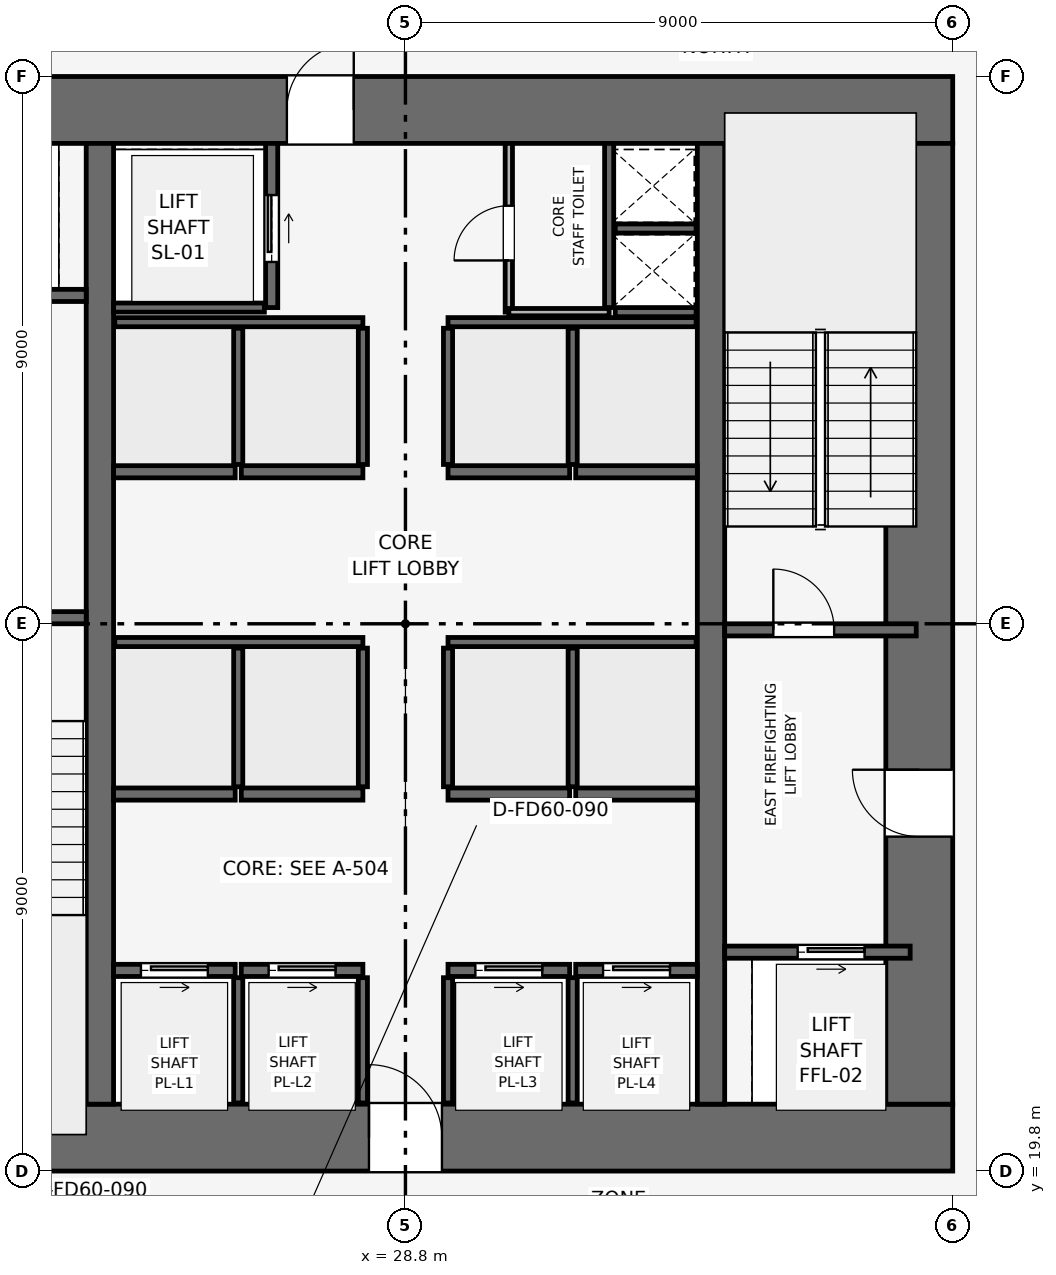
"""IFC4 building model, lengths in metres.
Left out: names, types, materials, properties, quantities, classifications, styles, units other than length and angle.
Written with IfcOpenShell. Run it as: python <this file> out.ifc"""

import sys

from ifc_helpers import new_model, si_unit, direction, frame, frame_2d, origin, place, context, subcontext, project, spatial, rectangle, extrude, element, fill, save


model = new_model("IFC4")
c1 = context("Model", 3, precision=1e-05, world=origin(), true_north=direction((0.0, 1.0)))
c2 = subcontext(c1, "Body", "Model", "MODEL_VIEW")
j1 = project(units=[si_unit("LENGTHUNIT", "METRE"), si_unit("PLANEANGLEUNIT", "RADIAN")], contexts=[c1])
p1 = place(None, origin())
s1 = spatial("IfcSite", under=j1, at=p1, CompositionType="ELEMENT")
p2 = place(p1, origin())
s2 = spatial("IfcBuilding", under=s1, at=p2, CompositionType="ELEMENT")
p3 = place(p2, frame((0.0, 0.0, 65.1)))
s3 = spatial("IfcBuildingStorey", under=s2, at=p3, CompositionType="ELEMENT", Elevation=65.1)
p4 = place(p3, frame((19.8, 20.35, 0.0), z_axis=(0.0, 0.0, 1.0), x_axis=(1.0, 0.0, 0.0)))
e1 = element("IfcWall", 1, at=p4, inside=s3, PredefinedType="SHEAR", context=c2, shape_type="SweptSolid", body=[
    extrude(rectangle(XDim=18.0, YDim=1.1, at=frame_2d((9.0, 0.0))), origin(), (0.0, 0.0, 1.0), 3.9),
])
p5 = place(p4, frame((8.4, 0.0, 0.0)))
e2 = element("IfcOpeningElement", 2, at=p5, cuts=e1, PredefinedType="OPENING", context=c2, shape_type="SweptSolid", body=[
    extrude(rectangle(XDim=1.2, YDim=2.2, at=frame_2d((0.6, 1.1))), frame((0.0, 0.56, 0.0), z_axis=(0.0, -1.0, 0.0), x_axis=(1.0, 0.0, 0.0)), (0.0, 0.0, 1.0), 1.12),
])
p6 = place(p3, frame((19.8, 37.25, 0.0), z_axis=(0.0, 0.0, 1.0), x_axis=(1.0, 0.0, 0.0)))
e3 = element("IfcWall", 3, at=p6, inside=s3, PredefinedType="SHEAR", context=c2, shape_type="SweptSolid", body=[
    extrude(rectangle(XDim=18.0, YDim=1.1, at=frame_2d((9.0, 0.0))), origin(), (0.0, 0.0, 1.0), 3.9),
])
p7 = place(p6, frame((7.05, 0.0, 0.0)))
e4 = element("IfcOpeningElement", 4, at=p7, cuts=e3, PredefinedType="OPENING", context=c2, shape_type="SweptSolid", body=[
    extrude(rectangle(XDim=1.1, YDim=2.15, at=frame_2d((0.55, 1.075))), frame((0.0, 0.56, 0.0), z_axis=(0.0, -1.0, 0.0), x_axis=(1.0, 0.0, 0.0)), (0.0, 0.0, 1.0), 1.12),
])
p8 = place(p3, frame((37.25, 20.9, 0.0), z_axis=(0.0, 0.0, 1.0), x_axis=(0.0, 1.0, 0.0)))
e5 = element("IfcWall", 5, at=p8, inside=s3, PredefinedType="SHEAR", context=c2, shape_type="SweptSolid", body=[
    extrude(rectangle(XDim=15.8, YDim=1.1, at=frame_2d((7.9, 0.0))), origin(), (0.0, 0.0, 1.0), 3.9),
])
p9 = place(p8, frame((4.4, 0.0, 0.0)))
e6 = element("IfcOpeningElement", 6, at=p9, cuts=e5, PredefinedType="OPENING", context=c2, shape_type="SweptSolid", body=[
    extrude(rectangle(XDim=1.1, YDim=2.15, at=frame_2d((0.55, 1.075))), frame((0.0, 0.56, 0.0), z_axis=(0.0, -1.0, 0.0), x_axis=(1.0, 0.0, 0.0)), (0.0, 0.0, 1.0), 1.12),
])
for number, where, z_axis, x_axis in (
    (7, (23.775, 20.9, 0.0), (0.0, 0.0, 1.0), (0.0, 1.0, 0.0)),
    (8, (33.825, 20.9, 0.0), (0.0, 0.0, 1.0), (0.0, 1.0, 0.0)),
):
    element("IfcWall", number, at=place(p3, frame(where, z_axis=z_axis, x_axis=x_axis)), inside=s3, PredefinedType="SHEAR", context=c2, shape_type="SweptSolid", body=[
        extrude(rectangle(XDim=15.8, YDim=0.45, at=frame_2d((7.9, 0.0))), origin(), (0.0, 0.0, 1.0), 3.9),
    ])
p10 = place(p3, frame((20.4, 28.9, 0.0), z_axis=(0.0, 0.0, 1.0), x_axis=(1.0, 0.0, 0.0)))
e9 = element("IfcWall", 9, at=p10, inside=s3, PredefinedType="SHEAR", context=c2, shape_type="SweptSolid", body=[
    extrude(rectangle(XDim=3.15, YDim=0.2, at=frame_2d((1.575, 0.0))), origin(), (0.0, 0.0, 1.0), 3.65),
])
p11 = place(p10, frame((0.8, 0.0, 0.0)))
e10 = element("IfcOpeningElement", 10, at=p11, cuts=e9, PredefinedType="OPENING", context=c2, shape_type="SweptSolid", body=[
    extrude(rectangle(XDim=1.0, YDim=2.1, at=frame_2d((0.5, 1.05))), frame((0.0, 0.11, 0.0), z_axis=(0.0, -1.0, 0.0), x_axis=(1.0, 0.0, 0.0)), (0.0, 0.0, 1.0), 0.22),
])
p12 = place(p3, frame((34.05, 28.7, 0.0), z_axis=(0.0, 0.0, 1.0), x_axis=(1.0, 0.0, 0.0)))
e11 = element("IfcWall", 11, at=p12, inside=s3, PredefinedType="SHEAR", context=c2, shape_type="SweptSolid", body=[
    extrude(rectangle(XDim=3.15, YDim=0.2, at=frame_2d((1.575, 0.0))), origin(), (0.0, 0.0, 1.0), 3.65),
])
p13 = place(p12, frame((0.8, 0.0, 0.0)))
e12 = element("IfcOpeningElement", 12, at=p13, cuts=e11, PredefinedType="OPENING", context=c2, shape_type="SweptSolid", body=[
    extrude(rectangle(XDim=1.0, YDim=2.1, at=frame_2d((0.5, 1.05))), frame((0.0, 0.11, 0.0), z_axis=(0.0, -1.0, 0.0), x_axis=(1.0, 0.0, 0.0)), (0.0, 0.0, 1.0), 0.22),
])
p14 = place(p3, frame((32.15, 34.0, 0.0), z_axis=(0.0, 0.0, 1.0), x_axis=(0.0, 1.0, 0.0)))
e13 = element("IfcWall", 13, at=p14, inside=s3, PredefinedType="SHEAR", context=c2, shape_type="SweptSolid", body=[
    extrude(rectangle(XDim=2.7, YDim=0.15, at=frame_2d((1.35, 0.0))), origin(), (0.0, 0.0, 1.0), 3.65),
])
for number, where, z_axis, x_axis in (
    (14, (32.25, 33.925, 0.0), (0.0, 0.0, 1.0), (1.0, 0.0, 0.0)),
    (15, (32.25, 35.3, 0.0), (0.0, 0.0, 1.0), (1.0, 0.0, 0.0)),
):
    element("IfcWall", number, at=place(p3, frame(where, z_axis=z_axis, x_axis=x_axis)), inside=s3, PredefinedType="SHEAR", context=c2, shape_type="SweptSolid", body=[
        extrude(rectangle(XDim=1.33, YDim=0.15, at=frame_2d((0.665, 0.0))), origin(), (0.0, 0.0, 1.0), 3.65),
    ])
p15 = place(p3, frame((20.5, 34.2, 0.0), z_axis=(0.0, 0.0, 1.0), x_axis=(1.0, 0.0, 0.0)))
e16 = element("IfcWall", 16, at=p15, inside=s3, PredefinedType="SHEAR", context=c2, shape_type="SweptSolid", body=[
    extrude(rectangle(XDim=3.05, YDim=0.2, at=frame_2d((1.525, 0.0))), origin(), (0.0, 0.0, 1.0), 3.65),
])
p16 = place(p15, frame((0.75, 0.0, 0.0)))
e17 = element("IfcOpeningElement", 17, at=p16, cuts=e16, PredefinedType="OPENING", context=c2, shape_type="SweptSolid", body=[
    extrude(rectangle(XDim=1.1, YDim=2.15, at=frame_2d((0.55, 1.075))), frame((0.0, 0.11, 0.0), z_axis=(0.0, -1.0, 0.0), x_axis=(1.0, 0.0, 0.0)), (0.0, 0.0, 1.0), 0.22),
])
p17 = place(p3, frame((34.05, 23.4, 0.0), z_axis=(0.0, 0.0, 1.0), x_axis=(1.0, 0.0, 0.0)))
e18 = element("IfcWall", 18, at=p17, inside=s3, PredefinedType="SHEAR", context=c2, shape_type="SweptSolid", body=[
    extrude(rectangle(XDim=3.05, YDim=0.2, at=frame_2d((1.525, 0.0))), origin(), (0.0, 0.0, 1.0), 3.65),
])
p18 = place(p17, frame((1.2, 0.0, 0.0)))
e19 = element("IfcOpeningElement", 19, at=p18, cuts=e18, PredefinedType="OPENING", context=c2, shape_type="SweptSolid", body=[
    extrude(rectangle(XDim=1.1, YDim=2.15, at=frame_2d((0.55, 1.075))), frame((0.0, 0.11, 0.0), z_axis=(0.0, -1.0, 0.0), x_axis=(1.0, 0.0, 0.0)), (0.0, 0.0, 1.0), 0.22),
])
p19 = place(p3, frame((26.6, 34.0, 0.0), z_axis=(0.0, 0.0, 1.0), x_axis=(0.0, 1.0, 0.0)))
e20 = element("IfcWall", 20, at=p19, inside=s3, PredefinedType="SHEAR", context=c2, shape_type="SweptSolid", body=[
    extrude(rectangle(XDim=2.7, YDim=0.2, at=frame_2d((1.35, 0.0))), origin(), (0.0, 0.0, 1.0), 3.65),
])
p20 = place(p19, frame((0.75, 0.0, 0.0)))
e21 = element("IfcOpeningElement", 21, at=p20, cuts=e20, PredefinedType="OPENING", context=c2, shape_type="SweptSolid", body=[
    extrude(rectangle(XDim=1.1, YDim=2.15, at=frame_2d((0.55, 1.075))), frame((0.0, 0.11, 0.0), z_axis=(0.0, -1.0, 0.0), x_axis=(1.0, 0.0, 0.0)), (0.0, 0.0, 1.0), 0.22),
])
p21 = place(p3, frame((24.0, 34.0, 0.0), z_axis=(0.0, 0.0, 1.0), x_axis=(1.0, 0.0, 0.0)))
e22 = element("IfcWall", 22, at=p21, inside=s3, PredefinedType="SHEAR", context=c2, shape_type="SweptSolid", body=[
    extrude(rectangle(XDim=2.48, YDim=0.15, at=frame_2d((1.24, 0.0))), origin(), (0.0, 0.0, 1.0), 3.65),
])
p22 = place(p3, frame((24.0, 23.1, 0.0), z_axis=(0.0, 0.0, 1.0), x_axis=(1.0, 0.0, 0.0)))
e23 = element("IfcWall", 23, at=p22, inside=s3, PredefinedType="SHEAR", context=c2, shape_type="SweptSolid", body=[
    extrude(rectangle(XDim=2.0, YDim=0.2, at=frame_2d((1.0, 0.0))), origin(), (0.0, 0.0, 1.0), 3.65),
])
p23 = place(p22, frame((0.45, 0.0, 0.0)))
e24 = element("IfcOpeningElement", 24, at=p23, cuts=e23, PredefinedType="OPENING", context=c2, shape_type="SweptSolid", body=[
    extrude(rectangle(XDim=1.1, YDim=2.15, at=frame_2d((0.55, 1.075))), frame((0.0, 0.11, 0.0), z_axis=(0.0, -1.0, 0.0), x_axis=(1.0, 0.0, 0.0)), (0.0, 0.0, 1.0), 0.22),
])
p24 = place(p3, frame((26.1, 23.1, 0.0), z_axis=(0.0, 0.0, 1.0), x_axis=(1.0, 0.0, 0.0)))
e25 = element("IfcWall", 25, at=p24, inside=s3, PredefinedType="SHEAR", context=c2, shape_type="SweptSolid", body=[
    extrude(rectangle(XDim=2.0, YDim=0.2, at=frame_2d((1.0, 0.0))), origin(), (0.0, 0.0, 1.0), 3.65),
])
p25 = place(p24, frame((0.45, 0.0, 0.0)))
e26 = element("IfcOpeningElement", 26, at=p25, cuts=e25, PredefinedType="OPENING", context=c2, shape_type="SweptSolid", body=[
    extrude(rectangle(XDim=1.1, YDim=2.15, at=frame_2d((0.55, 1.075))), frame((0.0, 0.11, 0.0), z_axis=(0.0, -1.0, 0.0), x_axis=(1.0, 0.0, 0.0)), (0.0, 0.0, 1.0), 0.22),
])
p26 = place(p3, frame((29.5, 23.1, 0.0), z_axis=(0.0, 0.0, 1.0), x_axis=(1.0, 0.0, 0.0)))
e27 = element("IfcWall", 27, at=p26, inside=s3, PredefinedType="SHEAR", context=c2, shape_type="SweptSolid", body=[
    extrude(rectangle(XDim=2.0, YDim=0.2, at=frame_2d((1.0, 0.0))), origin(), (0.0, 0.0, 1.0), 3.65),
])
p27 = place(p26, frame((0.45, 0.0, 0.0)))
e28 = element("IfcOpeningElement", 28, at=p27, cuts=e27, PredefinedType="OPENING", context=c2, shape_type="SweptSolid", body=[
    extrude(rectangle(XDim=1.1, YDim=2.15, at=frame_2d((0.55, 1.075))), frame((0.0, 0.11, 0.0), z_axis=(0.0, -1.0, 0.0), x_axis=(1.0, 0.0, 0.0)), (0.0, 0.0, 1.0), 0.22),
])
p28 = place(p3, frame((31.6, 23.1, 0.0), z_axis=(0.0, 0.0, 1.0), x_axis=(1.0, 0.0, 0.0)))
e29 = element("IfcWall", 29, at=p28, inside=s3, PredefinedType="SHEAR", context=c2, shape_type="SweptSolid", body=[
    extrude(rectangle(XDim=2.0, YDim=0.2, at=frame_2d((1.0, 0.0))), origin(), (0.0, 0.0, 1.0), 3.65),
])
p29 = place(p28, frame((0.45, 0.0, 0.0)))
e30 = element("IfcOpeningElement", 30, at=p29, cuts=e29, PredefinedType="OPENING", context=c2, shape_type="SweptSolid", body=[
    extrude(rectangle(XDim=1.1, YDim=2.15, at=frame_2d((0.55, 1.075))), frame((0.0, 0.11, 0.0), z_axis=(0.0, -1.0, 0.0), x_axis=(1.0, 0.0, 0.0)), (0.0, 0.0, 1.0), 0.22),
])
for number, where, z_axis, x_axis in (
    (31, (24.0, 26.0, 0.0), (0.0, 0.0, 1.0), (1.0, 0.0, 0.0)),
    (32, (26.1, 26.0, 0.0), (0.0, 0.0, 1.0), (1.0, 0.0, 0.0)),
    (33, (29.5, 26.0, 0.0), (0.0, 0.0, 1.0), (1.0, 0.0, 0.0)),
    (34, (31.6, 26.0, 0.0), (0.0, 0.0, 1.0), (1.0, 0.0, 0.0)),
    (35, (24.0, 31.3, 0.0), (0.0, 0.0, 1.0), (1.0, 0.0, 0.0)),
    (36, (26.1, 31.3, 0.0), (0.0, 0.0, 1.0), (1.0, 0.0, 0.0)),
    (37, (29.5, 31.3, 0.0), (0.0, 0.0, 1.0), (1.0, 0.0, 0.0)),
    (38, (31.6, 31.3, 0.0), (0.0, 0.0, 1.0), (1.0, 0.0, 0.0)),
):
    element("IfcWall", number, at=place(p3, frame(where, z_axis=z_axis, x_axis=x_axis)), inside=s3, PredefinedType="SHEAR", context=c2, shape_type="SweptSolid", body=[
        extrude(rectangle(XDim=2.0, YDim=0.2, at=frame_2d((1.0, 0.0))), origin(), (0.0, 0.0, 1.0), 3.65),
    ])
for number, where, z_axis, x_axis in (
    (39, (26.05, 20.92, 0.0), (0.0, 0.0, 1.0), (0.0, 1.0, 0.0)),
    (40, (28.1, 20.92, 0.0), (0.0, 0.0, 1.0), (0.0, 1.0, 0.0)),
    (41, (29.5, 20.92, 0.0), (0.0, 0.0, 1.0), (0.0, 1.0, 0.0)),
    (42, (31.55, 20.92, 0.0), (0.0, 0.0, 1.0), (0.0, 1.0, 0.0)),
):
    element("IfcWall", number, at=place(p3, frame(where, z_axis=z_axis, x_axis=x_axis)), inside=s3, PredefinedType="SHEAR", context=c2, shape_type="SweptSolid", body=[
        extrude(rectangle(XDim=2.06, YDim=0.15, at=frame_2d((1.03, 0.0))), origin(), (0.0, 0.0, 1.0), 3.65),
    ])
for number, where, z_axis, x_axis in (
    (43, (24.02, 28.5, 0.0), (0.0, 0.0, 1.0), (1.0, 0.0, 0.0)),
    (44, (29.5, 28.5, 0.0), (0.0, 0.0, 1.0), (1.0, 0.0, 0.0)),
):
    element("IfcWall", number, at=place(p3, frame(where, z_axis=z_axis, x_axis=x_axis)), inside=s3, PredefinedType="SHEAR", context=c2, shape_type="SweptSolid", body=[
        extrude(rectangle(XDim=4.08, YDim=0.15, at=frame_2d((2.04, 0.0))), origin(), (0.0, 0.0, 1.0), 3.65),
    ])
for number, where, z_axis, x_axis in (
    (45, (26.05, 26.12, 0.0), (0.0, 0.0, 1.0), (0.0, 1.0, 0.0)),
    (46, (28.1, 26.12, 0.0), (0.0, 0.0, 1.0), (0.0, 1.0, 0.0)),
    (47, (29.5, 26.12, 0.0), (0.0, 0.0, 1.0), (0.0, 1.0, 0.0)),
    (48, (31.55, 26.12, 0.0), (0.0, 0.0, 1.0), (0.0, 1.0, 0.0)),
):
    element("IfcWall", number, at=place(p3, frame(where, z_axis=z_axis, x_axis=x_axis)), inside=s3, PredefinedType="SHEAR", context=c2, shape_type="SweptSolid", body=[
        extrude(rectangle(XDim=2.28, YDim=0.15, at=frame_2d((1.14, 0.0))), origin(), (0.0, 0.0, 1.0), 3.65),
    ])
for number, where, z_axis, x_axis in (
    (49, (24.02, 33.76, 0.0), (0.0, 0.0, 1.0), (1.0, 0.0, 0.0)),
    (50, (29.5, 33.76, 0.0), (0.0, 0.0, 1.0), (1.0, 0.0, 0.0)),
):
    element("IfcWall", number, at=place(p3, frame(where, z_axis=z_axis, x_axis=x_axis)), inside=s3, PredefinedType="SHEAR", context=c2, shape_type="SweptSolid", body=[
        extrude(rectangle(XDim=4.08, YDim=0.15, at=frame_2d((2.04, 0.0))), origin(), (0.0, 0.0, 1.0), 3.65),
    ])
for number, where, z_axis, x_axis in (
    (51, (26.05, 31.42, 0.0), (0.0, 0.0, 1.0), (0.0, 1.0, 0.0)),
    (52, (28.1, 31.42, 0.0), (0.0, 0.0, 1.0), (0.0, 1.0, 0.0)),
    (53, (29.5, 31.42, 0.0), (0.0, 0.0, 1.0), (0.0, 1.0, 0.0)),
    (54, (31.55, 31.42, 0.0), (0.0, 0.0, 1.0), (0.0, 1.0, 0.0)),
):
    element("IfcWall", number, at=place(p3, frame(where, z_axis=z_axis, x_axis=x_axis)), inside=s3, PredefinedType="SHEAR", context=c2, shape_type="SweptSolid", body=[
        extrude(rectangle(XDim=2.24, YDim=0.15, at=frame_2d((1.12, 0.0))), origin(), (0.0, 0.0, 1.0), 3.65),
    ])
p30 = place(p3, frame((30.5, 33.925, 0.0), z_axis=(0.0, 0.0, 1.0), x_axis=(0.0, 1.0, 0.0)))
e55 = element("IfcWall", 55, at=p30, inside=s3, PredefinedType="PARTITIONING", context=c2, shape_type="SweptSolid", body=[
    extrude(rectangle(XDim=2.775, YDim=0.12, at=frame_2d((1.387, 0.0))), origin(), (0.0, 0.0, 1.0), 3.65),
])
p31 = place(p30, frame((0.85, 0.0, 0.0)))
e56 = element("IfcOpeningElement", 56, at=p31, cuts=e55, PredefinedType="OPENING", context=c2, shape_type="SweptSolid", body=[
    extrude(rectangle(XDim=0.9, YDim=2.1, at=frame_2d((0.45, 1.05))), frame((0.0, 0.07, 0.0), z_axis=(0.0, -1.0, 0.0), x_axis=(1.0, 0.0, 0.0)), (0.0, 0.0, 1.0), 0.14),
])
p32 = place(p3, frame((30.5, 33.925, 0.0), z_axis=(0.0, 0.0, 1.0), x_axis=(1.0, 0.0, 0.0)))
e57 = element("IfcWall", 57, at=p32, inside=s3, PredefinedType="PARTITIONING", context=c2, shape_type="SweptSolid", body=[
    extrude(rectangle(XDim=1.65, YDim=0.12, at=frame_2d((0.825, 0.0))), origin(), (0.0, 0.0, 1.0), 3.65),
])
p33 = place(p13, origin())
e58 = element("IfcDoor", 58, at=p33, inside=s3, OperationType="SINGLE_SWING_LEFT", PredefinedType="DOOR", context=c2, shape_type="SweptSolid", body=[
    extrude(rectangle(XDim=1.0, YDim=2.1, at=frame_2d((0.5, 1.05))), frame((0.0, 0.025, 0.0), z_axis=(0.0, -1.0, 0.0), x_axis=(1.0, 0.0, 0.0)), (0.0, 0.0, 1.0), 0.05),
])
fill(e12, e58)
p34 = place(p18, origin())
e59 = element("IfcDoor", 59, at=p34, inside=s3, OperationType="SLIDING_TO_RIGHT", PredefinedType="DOOR", context=c2, shape_type="SweptSolid", body=[
    extrude(rectangle(XDim=1.1, YDim=2.15, at=frame_2d((0.55, 1.075))), frame((0.0, 0.025, 0.0), z_axis=(0.0, -1.0, 0.0), x_axis=(1.0, 0.0, 0.0)), (0.0, 0.0, 1.0), 0.05),
])
fill(e19, e59)
p35 = place(p20, origin())
e60 = element("IfcDoor", 60, at=p35, inside=s3, OperationType="SLIDING_TO_RIGHT", PredefinedType="DOOR", context=c2, shape_type="SweptSolid", body=[
    extrude(rectangle(XDim=1.1, YDim=2.15, at=frame_2d((0.55, 1.075))), frame((0.0, 0.025, 0.0), z_axis=(0.0, -1.0, 0.0), x_axis=(1.0, 0.0, 0.0)), (0.0, 0.0, 1.0), 0.05),
])
fill(e21, e60)
p36 = place(p23, origin())
e61 = element("IfcDoor", 61, at=p36, inside=s3, OperationType="SLIDING_TO_RIGHT", PredefinedType="DOOR", context=c2, shape_type="SweptSolid", body=[
    extrude(rectangle(XDim=1.1, YDim=2.15, at=frame_2d((0.55, 1.075))), frame((0.0, 0.025, 0.0), z_axis=(0.0, -1.0, 0.0), x_axis=(1.0, 0.0, 0.0)), (0.0, 0.0, 1.0), 0.05),
])
fill(e24, e61)
p37 = place(p25, origin())
e62 = element("IfcDoor", 62, at=p37, inside=s3, OperationType="SLIDING_TO_RIGHT", PredefinedType="DOOR", context=c2, shape_type="SweptSolid", body=[
    extrude(rectangle(XDim=1.1, YDim=2.15, at=frame_2d((0.55, 1.075))), frame((0.0, 0.025, 0.0), z_axis=(0.0, -1.0, 0.0), x_axis=(1.0, 0.0, 0.0)), (0.0, 0.0, 1.0), 0.05),
])
fill(e26, e62)
p38 = place(p27, origin())
e63 = element("IfcDoor", 63, at=p38, inside=s3, OperationType="SLIDING_TO_RIGHT", PredefinedType="DOOR", context=c2, shape_type="SweptSolid", body=[
    extrude(rectangle(XDim=1.1, YDim=2.15, at=frame_2d((0.55, 1.075))), frame((0.0, 0.025, 0.0), z_axis=(0.0, -1.0, 0.0), x_axis=(1.0, 0.0, 0.0)), (0.0, 0.0, 1.0), 0.05),
])
fill(e28, e63)
p39 = place(p29, origin())
e64 = element("IfcDoor", 64, at=p39, inside=s3, OperationType="SLIDING_TO_RIGHT", PredefinedType="DOOR", context=c2, shape_type="SweptSolid", body=[
    extrude(rectangle(XDim=1.1, YDim=2.15, at=frame_2d((0.55, 1.075))), frame((0.0, 0.025, 0.0), z_axis=(0.0, -1.0, 0.0), x_axis=(1.0, 0.0, 0.0)), (0.0, 0.0, 1.0), 0.05),
])
fill(e30, e64)
p40 = place(p31, origin())
e65 = element("IfcDoor", 65, at=p40, inside=s3, OperationType="SINGLE_SWING_LEFT", PredefinedType="DOOR", context=c2, shape_type="SweptSolid", body=[
    extrude(rectangle(XDim=0.9, YDim=2.1, at=frame_2d((0.45, 1.05))), frame((0.0, 0.025, 0.0), z_axis=(0.0, -1.0, 0.0), x_axis=(1.0, 0.0, 0.0)), (0.0, 0.0, 1.0), 0.05),
])
fill(e56, e65)
p41 = place(p9, origin())
e66 = element("IfcDoor", 66, at=p41, inside=s3, OperationType="SINGLE_SWING_RIGHT", PredefinedType="DOOR", context=c2, shape_type="SweptSolid", body=[
    extrude(rectangle(XDim=1.1, YDim=2.15, at=frame_2d((0.55, 1.075))), frame((0.0, 0.025, 0.0), z_axis=(0.0, -1.0, 0.0), x_axis=(1.0, 0.0, 0.0)), (0.0, 0.0, 1.0), 0.05),
])
fill(e6, e66)
p42 = place(p5, origin())
e67 = element("IfcDoor", 67, at=p42, inside=s3, OperationType="SINGLE_SWING_LEFT", PredefinedType="DOOR", context=c2, shape_type="SweptSolid", body=[
    extrude(rectangle(XDim=1.2, YDim=2.2, at=frame_2d((0.6, 1.1))), frame((0.0, 0.025, 0.0), z_axis=(0.0, -1.0, 0.0), x_axis=(1.0, 0.0, 0.0)), (0.0, 0.0, 1.0), 0.05),
])
fill(e2, e67)
p43 = place(p7, origin())
e68 = element("IfcDoor", 68, at=p43, inside=s3, OperationType="SINGLE_SWING_RIGHT", PredefinedType="DOOR", context=c2, shape_type="SweptSolid", body=[
    extrude(rectangle(XDim=1.1, YDim=2.15, at=frame_2d((0.55, 1.075))), frame((0.0, 0.025, 0.0), z_axis=(0.0, -1.0, 0.0), x_axis=(1.0, 0.0, 0.0)), (0.0, 0.0, 1.0), 0.05),
])
fill(e4, e68)
save(model, sys.argv[1])
